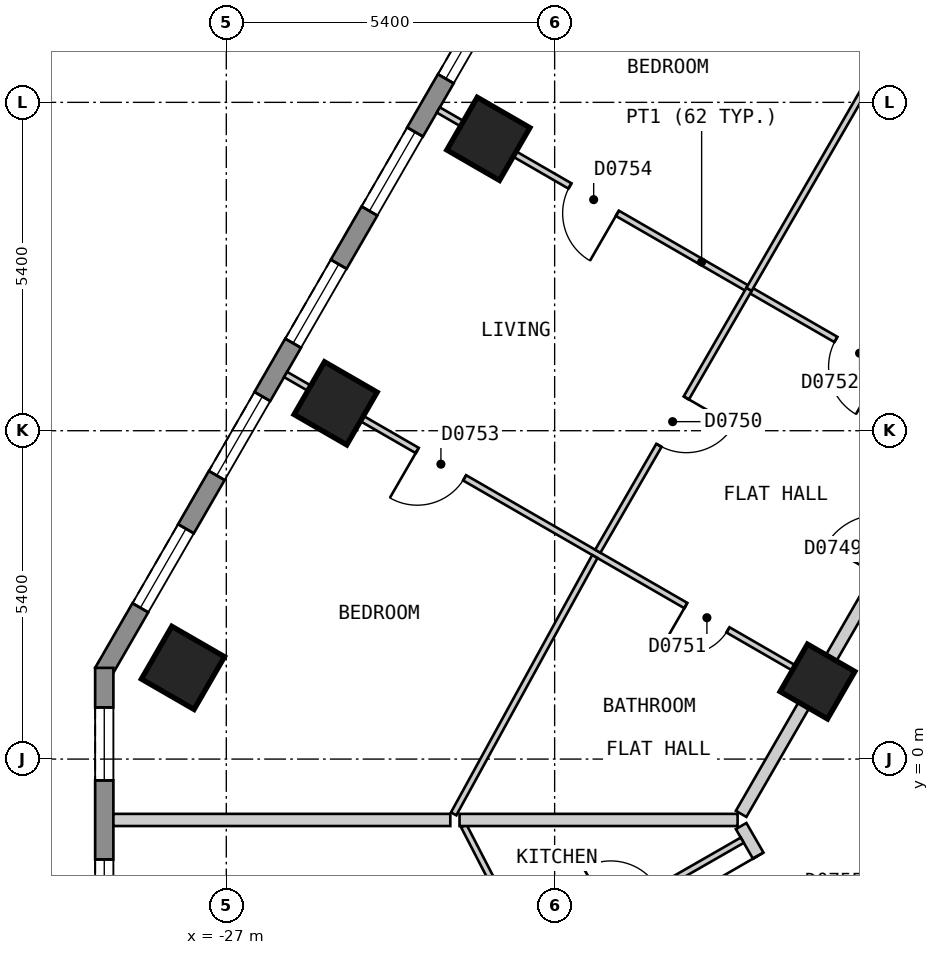
"""IFC4 building model, lengths in metres.
Left out: names, types, materials, properties, quantities, classifications, styles, units other than length and angle.
Written with IfcOpenShell. Run it as: python <this file> out.ifc"""

import sys

from ifc_helpers import new_model, si_unit, direction, frame, frame_2d, origin, origin_2d, place, context, subcontext, project, spatial, polyline, rectangle, outline, extrude, element, fill, save


model = new_model("IFC4")
c1 = context("Model", 3, precision=1e-05, world=origin(), true_north=direction((0.0, 1.0)))
c2 = subcontext(c1, "Body", "Model", "MODEL_VIEW")
j1 = project(units=[si_unit("LENGTHUNIT", "METRE"), si_unit("PLANEANGLEUNIT", "RADIAN")], contexts=[c1])
p1 = place(None, origin())
s1 = spatial("IfcSite", under=j1, at=p1, CompositionType="ELEMENT")
p2 = place(p1, origin())
s2 = spatial("IfcBuilding", under=s1, at=p2, CompositionType="ELEMENT")
p3 = place(p2, frame((0.0, 0.0, 99.0)))
s3 = spatial("IfcBuildingStorey", under=s2, at=p3, CompositionType="ELEMENT", Elevation=99.0)
for number, where, z_axis, x_axis in (
    (1, (-22.69, 10.2, 0.0), (0.0, 0.0, 1.0), (-0.5, -0.866, 0.0)),
    (2, (-25.202, 5.85, 0.0), (0.0, 0.0, 1.0), (-0.5, -0.866, 0.0)),
    (3, (-27.713, 1.5, 0.0), (0.0, 0.0, 1.0), (-0.5, -0.866, 0.0)),
):
    element("IfcColumn", number, at=place(p3, frame(where, z_axis=z_axis, x_axis=x_axis)), inside=s3, PredefinedType="COLUMN", context=c2, shape_type="SweptSolid", body=[
        extrude(rectangle(XDim=1.0, YDim=1.0, at=origin_2d()), origin(), (0.0, 0.0, 1.0), 3.0),
    ])
p4 = place(p3, frame((-17.277, 1.275, 0.0), z_axis=(0.0, 0.0, 1.0), x_axis=(-0.5, -0.866025403784, 0.0)))
e4 = element("IfcColumn", 4, at=p4, inside=s3, PredefinedType="COLUMN", context=c2, shape_type="SweptSolid", body=[
    extrude(rectangle(XDim=0.9, YDim=0.9, at=origin_2d()), origin(), (0.0, 0.0, 1.0), 3.0),
])
p5 = place(p3, frame((-15.747, 24.425, 0.0), z_axis=(0.0, 0.0, 1.0), x_axis=(-0.500027479704, -0.866009537788, 0.0)))
e5 = element("IfcWall", 5, at=p5, inside=s3, PredefinedType="SOLIDWALL", context=c2, shape_type="SweptSolid", body=[
    extrude(outline(polyline([(0.0, -0.15), (26.559, -0.15), (26.478, 0.15), (0.08, 0.15), (0.0, -0.15)])), origin(), (0.0, 0.0, 1.0), 2.7),
])
p6 = place(p5, frame((1.227, 0.0, 0.15)))
e6 = element("IfcOpeningElement", 6, at=p6, cuts=e5, PredefinedType="OPENING", context=c2, shape_type="SweptSolid", body=[
    extrude(rectangle(XDim=1.5, YDim=2.1, at=frame_2d((0.75, 1.05))), frame((0.0, 0.16, 0.0), z_axis=(0.0, -1.0, 0.0), x_axis=(1.0, 0.0, 0.0)), (0.0, 0.0, 1.0), 0.32),
])
p7 = place(p5, frame((3.739, 0.0, 0.15)))
e7 = element("IfcOpeningElement", 7, at=p7, cuts=e5, PredefinedType="OPENING", context=c2, shape_type="SweptSolid", body=[
    extrude(rectangle(XDim=1.5, YDim=2.1, at=frame_2d((0.75, 1.05))), frame((0.0, 0.16, 0.0), z_axis=(0.0, -1.0, 0.0), x_axis=(1.0, 0.0, 0.0)), (0.0, 0.0, 1.0), 0.32),
])
p8 = place(p5, frame((6.25, 0.0, 0.15)))
e8 = element("IfcOpeningElement", 8, at=p8, cuts=e5, PredefinedType="OPENING", context=c2, shape_type="SweptSolid", body=[
    extrude(rectangle(XDim=1.5, YDim=2.1, at=frame_2d((0.75, 1.05))), frame((0.0, 0.16, 0.0), z_axis=(0.0, -1.0, 0.0), x_axis=(1.0, 0.0, 0.0)), (0.0, 0.0, 1.0), 0.32),
])
p9 = place(p5, frame((8.761, 0.0, 0.15)))
e9 = element("IfcOpeningElement", 9, at=p9, cuts=e5, PredefinedType="OPENING", context=c2, shape_type="SweptSolid", body=[
    extrude(rectangle(XDim=1.5, YDim=2.1, at=frame_2d((0.75, 1.05))), frame((0.0, 0.16, 0.0), z_axis=(0.0, -1.0, 0.0), x_axis=(1.0, 0.0, 0.0)), (0.0, 0.0, 1.0), 0.32),
])
p10 = place(p5, frame((11.273, 0.0, 0.15)))
e10 = element("IfcOpeningElement", 10, at=p10, cuts=e5, PredefinedType="OPENING", context=c2, shape_type="SweptSolid", body=[
    extrude(rectangle(XDim=1.5, YDim=2.1, at=frame_2d((0.75, 1.05))), frame((0.0, 0.16, 0.0), z_axis=(0.0, -1.0, 0.0), x_axis=(1.0, 0.0, 0.0)), (0.0, 0.0, 1.0), 0.32),
])
p11 = place(p5, frame((13.785, 0.0, 0.15)))
e11 = element("IfcOpeningElement", 11, at=p11, cuts=e5, PredefinedType="OPENING", context=c2, shape_type="SweptSolid", body=[
    extrude(rectangle(XDim=1.5, YDim=2.1, at=frame_2d((0.75, 1.05))), frame((0.0, 0.16, 0.0), z_axis=(0.0, -1.0, 0.0), x_axis=(1.0, 0.0, 0.0)), (0.0, 0.0, 1.0), 0.32),
])
p12 = place(p5, frame((16.296, 0.0, 0.15)))
e12 = element("IfcOpeningElement", 12, at=p12, cuts=e5, PredefinedType="OPENING", context=c2, shape_type="SweptSolid", body=[
    extrude(rectangle(XDim=1.5, YDim=2.1, at=frame_2d((0.75, 1.05))), frame((0.0, 0.16, 0.0), z_axis=(0.0, -1.0, 0.0), x_axis=(1.0, 0.0, 0.0)), (0.0, 0.0, 1.0), 0.32),
])
p13 = place(p5, frame((18.807, 0.0, 0.15)))
e13 = element("IfcOpeningElement", 13, at=p13, cuts=e5, PredefinedType="OPENING", context=c2, shape_type="SweptSolid", body=[
    extrude(rectangle(XDim=1.5, YDim=2.1, at=frame_2d((0.75, 1.05))), frame((0.0, 0.16, 0.0), z_axis=(0.0, -1.0, 0.0), x_axis=(1.0, 0.0, 0.0)), (0.0, 0.0, 1.0), 0.32),
])
p14 = place(p5, frame((21.319, 0.0, 0.15)))
e14 = element("IfcOpeningElement", 14, at=p14, cuts=e5, PredefinedType="OPENING", context=c2, shape_type="SweptSolid", body=[
    extrude(rectangle(XDim=1.5, YDim=2.1, at=frame_2d((0.75, 1.05))), frame((0.0, 0.16, 0.0), z_axis=(0.0, -1.0, 0.0), x_axis=(1.0, 0.0, 0.0)), (0.0, 0.0, 1.0), 0.32),
])
p15 = place(p5, frame((23.831, 0.0, 0.15)))
e15 = element("IfcOpeningElement", 15, at=p15, cuts=e5, PredefinedType="OPENING", context=c2, shape_type="SweptSolid", body=[
    extrude(rectangle(XDim=1.5, YDim=2.1, at=frame_2d((0.75, 1.05))), frame((0.0, 0.16, 0.0), z_axis=(0.0, -1.0, 0.0), x_axis=(1.0, 0.0, 0.0)), (0.0, 0.0, 1.0), 0.32),
])
p16 = place(p3, frame((-29.007, 1.5, 0.0), z_axis=(0.0, 0.0, 1.0), x_axis=(0.0, -1.0, 0.0)))
e16 = element("IfcWall", 16, at=p16, inside=s3, PredefinedType="SOLIDWALL", context=c2, shape_type="SweptSolid", body=[
    extrude(outline(polyline([(0.0, -0.15), (5.0, -0.15), (4.92, 0.15), (0.08, 0.15), (0.0, -0.15)])), origin(), (0.0, 0.0, 1.0), 2.7),
])
p17 = place(p16, frame((0.65, 0.0, 0.15)))
e17 = element("IfcOpeningElement", 17, at=p17, cuts=e16, PredefinedType="OPENING", context=c2, shape_type="SweptSolid", body=[
    extrude(rectangle(XDim=1.2, YDim=2.1, at=frame_2d((0.6, 1.05))), frame((0.0, 0.16, 0.0), z_axis=(0.0, -1.0, 0.0), x_axis=(1.0, 0.0, 0.0)), (0.0, 0.0, 1.0), 0.32),
])
p18 = place(p16, frame((3.15, 0.0, 0.15)))
e18 = element("IfcOpeningElement", 18, at=p18, cuts=e16, PredefinedType="OPENING", context=c2, shape_type="SweptSolid", body=[
    extrude(rectangle(XDim=1.2, YDim=2.1, at=frame_2d((0.6, 1.05))), frame((0.0, 0.16, 0.0), z_axis=(0.0, -1.0, 0.0), x_axis=(1.0, 0.0, 0.0)), (0.0, 0.0, 1.0), 0.32),
])
p19 = place(p3, frame((-18.533, -1.101, 0.0), z_axis=(0.0, 0.0, 1.0), x_axis=(0.500135180047, -0.865947343479, 0.0)))
e19 = element("IfcWall", 19, at=p19, inside=s3, PredefinedType="PARTITIONING", context=c2, shape_type="SweptSolid", body=[
    extrude(rectangle(XDim=2.799, YDim=0.2, at=frame_2d((1.399, 0.0))), origin(), (0.0, 0.0, 1.0), 2.7),
])
p20 = place(p19, frame((0.562, 0.0, 0.0)))
e20 = element("IfcOpeningElement", 20, at=p20, cuts=e19, PredefinedType="OPENING", context=c2, shape_type="SweptSolid", body=[
    extrude(rectangle(XDim=1.0, YDim=2.1, at=frame_2d((0.5, 1.05))), frame((0.0, 0.11, 0.0), z_axis=(0.0, -1.0, 0.0), x_axis=(1.0, 0.0, 0.0)), (0.0, 0.0, 1.0), 0.22),
])
p21 = place(p3, frame((-18.533, -0.901, 0.0), z_axis=(0.0, 0.0, 1.0), x_axis=(0.499981198768, 0.866036258409, 0.0)))
e21 = element("IfcWall", 21, at=p21, inside=s3, PredefinedType="PARTITIONING", context=c2, shape_type="SweptSolid", body=[
    extrude(rectangle(XDim=20.093, YDim=0.2, at=frame_2d((10.046, 0.0))), origin(), (0.0, 0.0, 1.0), 2.7),
])
p22 = place(p21, frame((14.57, 0.0, 0.0)))
e22 = element("IfcOpeningElement", 22, at=p22, cuts=e21, PredefinedType="OPENING", context=c2, shape_type="SweptSolid", body=[
    extrude(rectangle(XDim=1.0, YDim=2.1, at=frame_2d((0.5, 1.05))), frame((0.0, 0.11, 0.0), z_axis=(0.0, -1.0, 0.0), x_axis=(1.0, 0.0, 0.0)), (0.0, 0.0, 1.0), 0.22),
])
p23 = place(p21, frame((4.523, 0.0, 0.0)))
e23 = element("IfcOpeningElement", 23, at=p23, cuts=e21, PredefinedType="OPENING", context=c2, shape_type="SweptSolid", body=[
    extrude(rectangle(XDim=1.0, YDim=2.1, at=frame_2d((0.5, 1.05))), frame((0.0, 0.11, 0.0), z_axis=(0.0, -1.0, 0.0), x_axis=(1.0, 0.0, 0.0)), (0.0, 0.0, 1.0), 0.22),
])
p24 = place(p3, frame((-23.093, -1.101, 0.0), z_axis=(0.0, 0.0, 1.0), x_axis=(0.459171814268, -0.888347479865, 0.0)))
e24 = element("IfcWall", 24, at=p24, inside=s3, PredefinedType="PARTITIONING", context=c2, shape_type="SweptSolid", body=[
    extrude(rectangle(XDim=2.01, YDim=0.1, at=frame_2d((1.005, 0.0))), origin(), (0.0, 0.0, 1.0), 2.7),
])
p25 = place(p3, frame((-26.025, 6.325, 0.0), z_axis=(0.0, 0.0, 1.0), x_axis=(0.866041268327, -0.499972520799, 0.0)))
e25 = element("IfcWall", 25, at=p25, inside=s3, PredefinedType="PARTITIONING", context=c2, shape_type="SweptSolid", body=[
    extrude(rectangle(XDim=10.0, YDim=0.1, at=frame_2d((5.0, 0.0))), origin(), (0.0, 0.0, 1.0), 2.7),
])
p26 = place(p25, frame((7.601, 0.0, 0.0)))
e26 = element("IfcOpeningElement", 26, at=p26, cuts=e25, PredefinedType="OPENING", context=c2, shape_type="SweptSolid", body=[
    extrude(rectangle(XDim=0.8, YDim=2.1, at=frame_2d((0.4, 1.05))), frame((0.0, 0.06, 0.0), z_axis=(0.0, -1.0, 0.0), x_axis=(1.0, 0.0, 0.0)), (0.0, 0.0, 1.0), 0.12),
])
p27 = place(p25, frame((2.5, 0.0, 0.0)))
e27 = element("IfcOpeningElement", 27, at=p27, cuts=e25, PredefinedType="OPENING", context=c2, shape_type="SweptSolid", body=[
    extrude(rectangle(XDim=0.9, YDim=2.1, at=frame_2d((0.45, 1.05))), frame((0.0, 0.06, 0.0), z_axis=(0.0, -1.0, 0.0), x_axis=(1.0, 0.0, 0.0)), (0.0, 0.0, 1.0), 0.12),
])
p28 = place(p3, frame((-23.513, 10.675, 0.0), z_axis=(0.0, 0.0, 1.0), x_axis=(0.866041268327, -0.499972520799, 0.0)))
e28 = element("IfcWall", 28, at=p28, inside=s3, PredefinedType="PARTITIONING", context=c2, shape_type="SweptSolid", body=[
    extrude(rectangle(XDim=10.0, YDim=0.1, at=frame_2d((5.0, 0.0))), origin(), (0.0, 0.0, 1.0), 2.7),
])
p29 = place(p28, frame((7.55, 0.0, 0.0)))
e29 = element("IfcOpeningElement", 29, at=p29, cuts=e28, PredefinedType="OPENING", context=c2, shape_type="SweptSolid", body=[
    extrude(rectangle(XDim=0.9, YDim=2.1, at=frame_2d((0.45, 1.05))), frame((0.0, 0.06, 0.0), z_axis=(0.0, -1.0, 0.0), x_axis=(1.0, 0.0, 0.0)), (0.0, 0.0, 1.0), 0.12),
])
p30 = place(p28, frame((2.5, 0.0, 0.0)))
e30 = element("IfcOpeningElement", 30, at=p30, cuts=e28, PredefinedType="OPENING", context=c2, shape_type="SweptSolid", body=[
    extrude(rectangle(XDim=0.9, YDim=2.1, at=frame_2d((0.45, 1.05))), frame((0.0, 0.06, 0.0), z_axis=(0.0, -1.0, 0.0), x_axis=(1.0, 0.0, 0.0)), (0.0, 0.0, 1.0), 0.12),
])
p31 = place(p3, frame((-20.89, 3.418, 0.0), z_axis=(0.0, 0.0, 1.0), x_axis=(0.500014231302, 0.866017187182, 0.0)))
e31 = element("IfcWall", 31, at=p31, inside=s3, PredefinedType="PARTITIONING", context=c2, shape_type="SweptSolid", body=[
    extrude(rectangle(XDim=4.973, YDim=0.1, at=frame_2d((2.487, 0.0))), origin(), (0.0, 0.0, 1.0), 2.7),
])
p32 = place(p31, frame((2.011, 0.0, 0.0)))
e32 = element("IfcOpeningElement", 32, at=p32, cuts=e31, PredefinedType="OPENING", context=c2, shape_type="SweptSolid", body=[
    extrude(rectangle(XDim=0.9, YDim=2.1, at=frame_2d((0.45, 1.05))), frame((0.0, 0.06, 0.0), z_axis=(0.0, -1.0, 0.0), x_axis=(1.0, 0.0, 0.0)), (0.0, 0.0, 1.0), 0.12),
])
p33 = place(p3, frame((-23.261, -0.901, 0.0), z_axis=(0.0, 0.0, 1.0), x_axis=(0.481037050261, 0.876700265927, 0.0)))
e33 = element("IfcWall", 33, at=p33, inside=s3, PredefinedType="PARTITIONING", context=c2, shape_type="SweptSolid", body=[
    extrude(rectangle(XDim=4.827, YDim=0.1, at=frame_2d((2.414, 0.0))), origin(), (0.0, 0.0, 1.0), 2.7),
])
p34 = place(p3, frame((-22.094, -3.388, 0.0), z_axis=(0.0, 0.0, 1.0), x_axis=(0.867386440944, 0.497635169644, 0.0)))
e34 = element("IfcWall", 34, at=p34, inside=s3, PredefinedType="PARTITIONING", context=c2, shape_type="SweptSolid", body=[
    extrude(rectangle(XDim=4.127, YDim=0.1, at=frame_2d((2.064, 0.0))), origin(), (0.0, 0.0, 1.0), 2.7),
])
p35 = place(p34, frame((1.634, 0.0, 0.0)))
e35 = element("IfcOpeningElement", 35, at=p35, cuts=e34, PredefinedType="OPENING", context=c2, shape_type="SweptSolid", body=[
    extrude(rectangle(XDim=0.9, YDim=2.1, at=frame_2d((0.45, 1.05))), frame((0.0, 0.06, 0.0), z_axis=(0.0, -1.0, 0.0), x_axis=(1.0, 0.0, 0.0)), (0.0, 0.0, 1.0), 0.12),
])
p36 = place(p3, frame((-28.857, -1.001, 0.0), z_axis=(0.0, 0.0, 1.0), x_axis=(1.0, 0.0, 0.0)))
e36 = element("IfcWall", 36, at=p36, inside=s3, PredefinedType="PARTITIONING", context=c2, shape_type="SweptSolid", body=[
    extrude(rectangle(XDim=5.541, YDim=0.2, at=frame_2d((2.771, 0.0))), origin(), (0.0, 0.0, 1.0), 2.7),
])
p37 = place(p3, frame((-23.164, -1.001, 0.0), z_axis=(0.0, 0.0, 1.0), x_axis=(1.0, 0.0, 0.0)))
e37 = element("IfcWall", 37, at=p37, inside=s3, PredefinedType="PARTITIONING", context=c2, shape_type="SweptSolid", body=[
    extrude(rectangle(XDim=4.573, YDim=0.2, at=frame_2d((2.287, 0.0))), origin(), (0.0, 0.0, 1.0), 2.7),
])
p38 = place(p3, frame((-18.403, 7.725, 0.0), z_axis=(0.0, 0.0, 1.0), x_axis=(0.499995794706, 0.866027831699, 0.0)))
e38 = element("IfcWall", 38, at=p38, inside=s3, PredefinedType="PARTITIONING", context=c2, shape_type="SweptSolid", body=[
    extrude(rectangle(XDim=4.922, YDim=0.1, at=frame_2d((2.461, 0.0))), origin(), (0.0, 0.0, 1.0), 2.7),
])
p39 = place(p11, origin())
e39 = element("IfcWindow", 39, at=p39, inside=s3, PartitioningType="SINGLE_PANEL", PredefinedType="WINDOW", context=c2, shape_type="SweptSolid", body=[
    extrude(rectangle(XDim=1.5, YDim=2.1, at=frame_2d((0.75, 1.05))), frame((0.0, 0.03, 0.0), z_axis=(0.0, -1.0, 0.0), x_axis=(1.0, 0.0, 0.0)), (0.0, 0.0, 1.0), 0.06),
])
fill(e11, e39)
p40 = place(p12, origin())
e40 = element("IfcWindow", 40, at=p40, inside=s3, PartitioningType="SINGLE_PANEL", PredefinedType="WINDOW", context=c2, shape_type="SweptSolid", body=[
    extrude(rectangle(XDim=1.5, YDim=2.1, at=frame_2d((0.75, 1.05))), frame((0.0, 0.03, 0.0), z_axis=(0.0, -1.0, 0.0), x_axis=(1.0, 0.0, 0.0)), (0.0, 0.0, 1.0), 0.06),
])
fill(e12, e40)
p41 = place(p13, origin())
e41 = element("IfcWindow", 41, at=p41, inside=s3, PartitioningType="SINGLE_PANEL", PredefinedType="WINDOW", context=c2, shape_type="SweptSolid", body=[
    extrude(rectangle(XDim=1.5, YDim=2.1, at=frame_2d((0.75, 1.05))), frame((0.0, 0.03, 0.0), z_axis=(0.0, -1.0, 0.0), x_axis=(1.0, 0.0, 0.0)), (0.0, 0.0, 1.0), 0.06),
])
fill(e13, e41)
p42 = place(p14, origin())
e42 = element("IfcWindow", 42, at=p42, inside=s3, PartitioningType="SINGLE_PANEL", PredefinedType="WINDOW", context=c2, shape_type="SweptSolid", body=[
    extrude(rectangle(XDim=1.5, YDim=2.1, at=frame_2d((0.75, 1.05))), frame((0.0, 0.03, 0.0), z_axis=(0.0, -1.0, 0.0), x_axis=(1.0, 0.0, 0.0)), (0.0, 0.0, 1.0), 0.06),
])
fill(e14, e42)
p43 = place(p15, origin())
e43 = element("IfcWindow", 43, at=p43, inside=s3, PartitioningType="SINGLE_PANEL", PredefinedType="WINDOW", context=c2, shape_type="SweptSolid", body=[
    extrude(rectangle(XDim=1.5, YDim=2.1, at=frame_2d((0.75, 1.05))), frame((0.0, 0.03, 0.0), z_axis=(0.0, -1.0, 0.0), x_axis=(1.0, 0.0, 0.0)), (0.0, 0.0, 1.0), 0.06),
])
fill(e15, e43)
p44 = place(p17, origin())
e44 = element("IfcWindow", 44, at=p44, inside=s3, PartitioningType="SINGLE_PANEL", PredefinedType="WINDOW", context=c2, shape_type="SweptSolid", body=[
    extrude(rectangle(XDim=1.2, YDim=2.1, at=frame_2d((0.6, 1.05))), frame((0.0, 0.03, 0.0), z_axis=(0.0, -1.0, 0.0), x_axis=(1.0, 0.0, 0.0)), (0.0, 0.0, 1.0), 0.06),
])
fill(e17, e44)
p45 = place(p18, origin())
e45 = element("IfcWindow", 45, at=p45, inside=s3, PartitioningType="SINGLE_PANEL", PredefinedType="WINDOW", context=c2, shape_type="SweptSolid", body=[
    extrude(rectangle(XDim=1.2, YDim=2.1, at=frame_2d((0.6, 1.05))), frame((0.0, 0.03, 0.0), z_axis=(0.0, -1.0, 0.0), x_axis=(1.0, 0.0, 0.0)), (0.0, 0.0, 1.0), 0.06),
])
fill(e18, e45)
p46 = place(p32, origin())
e46 = element("IfcDoor", 46, at=p46, inside=s3, OperationType="SINGLE_SWING_RIGHT", PredefinedType="DOOR", context=c2, shape_type="SweptSolid", body=[
    extrude(rectangle(XDim=0.9, YDim=2.1, at=frame_2d((0.45, 1.05))), frame((0.0, 0.025, 0.0), z_axis=(0.0, -1.0, 0.0), x_axis=(1.0, 0.0, 0.0)), (0.0, 0.0, 1.0), 0.05),
])
fill(e32, e46)
p47 = place(p26, origin())
e47 = element("IfcDoor", 47, at=p47, inside=s3, OperationType="SINGLE_SWING_LEFT", PredefinedType="DOOR", context=c2, shape_type="SweptSolid", body=[
    extrude(rectangle(XDim=0.8, YDim=2.1, at=frame_2d((0.4, 1.05))), frame((0.0, 0.025, 0.0), z_axis=(0.0, -1.0, 0.0), x_axis=(1.0, 0.0, 0.0)), (0.0, 0.0, 1.0), 0.05),
])
fill(e26, e47)
p48 = place(p29, origin())
e48 = element("IfcDoor", 48, at=p48, inside=s3, OperationType="SINGLE_SWING_RIGHT", PredefinedType="DOOR", context=c2, shape_type="SweptSolid", body=[
    extrude(rectangle(XDim=0.9, YDim=2.1, at=frame_2d((0.45, 1.05))), frame((0.0, 0.025, 0.0), z_axis=(0.0, -1.0, 0.0), x_axis=(1.0, 0.0, 0.0)), (0.0, 0.0, 1.0), 0.05),
])
fill(e29, e48)
p49 = place(p27, origin())
e49 = element("IfcDoor", 49, at=p49, inside=s3, OperationType="SINGLE_SWING_LEFT", PredefinedType="DOOR", context=c2, shape_type="SweptSolid", body=[
    extrude(rectangle(XDim=0.9, YDim=2.1, at=frame_2d((0.45, 1.05))), frame((0.0, 0.025, 0.0), z_axis=(0.0, -1.0, 0.0), x_axis=(1.0, 0.0, 0.0)), (0.0, 0.0, 1.0), 0.05),
])
fill(e27, e49)
p50 = place(p30, origin())
e50 = element("IfcDoor", 50, at=p50, inside=s3, OperationType="SINGLE_SWING_RIGHT", PredefinedType="DOOR", context=c2, shape_type="SweptSolid", body=[
    extrude(rectangle(XDim=0.9, YDim=2.1, at=frame_2d((0.45, 1.05))), frame((0.0, 0.025, 0.0), z_axis=(0.0, -1.0, 0.0), x_axis=(1.0, 0.0, 0.0)), (0.0, 0.0, 1.0), 0.05),
])
fill(e30, e50)
p51 = place(p20, origin())
e51 = element("IfcDoor", 51, at=p51, inside=s3, OperationType="SINGLE_SWING_LEFT", PredefinedType="DOOR", context=c2, shape_type="SweptSolid", body=[
    extrude(rectangle(XDim=1.0, YDim=2.1, at=frame_2d((0.5, 1.05))), frame((0.0, 0.025, 0.0), z_axis=(0.0, -1.0, 0.0), x_axis=(1.0, 0.0, 0.0)), (0.0, 0.0, 1.0), 0.05),
])
fill(e20, e51)
save(model, sys.argv[1])
